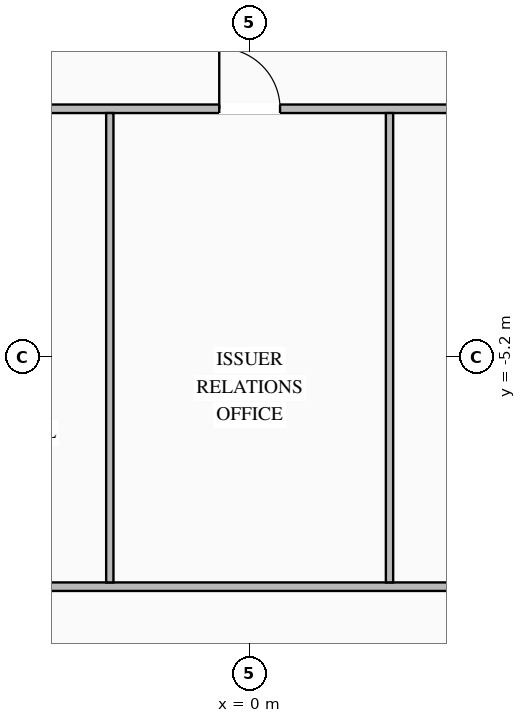
"""IFC4 building model, lengths in metres.
Left out: names, types, materials, properties, quantities, classifications, styles, units other than length and angle.
Written with IfcOpenShell. Run it as: python <this file> out.ifc"""

import sys

from ifc_helpers import new_model, si_unit, direction, frame, frame_2d, origin, place, context, subcontext, project, spatial, rectangle, extrude, element, fill, save


model = new_model("IFC4")
c1 = context("Model", 3, precision=1e-05, world=origin(), true_north=direction((0.0, 1.0)))
c2 = subcontext(c1, "Body", "Model", "MODEL_VIEW")
j1 = project(units=[si_unit("LENGTHUNIT", "METRE"), si_unit("PLANEANGLEUNIT", "RADIAN")], contexts=[c1])
p1 = place(None, origin())
s1 = spatial("IfcSite", under=j1, at=p1, CompositionType="ELEMENT")
p2 = place(p1, origin())
s2 = spatial("IfcBuilding", under=s1, at=p2, CompositionType="ELEMENT")
p3 = place(p2, frame((0.0, 0.0, 229.2)))
s3 = spatial("IfcBuildingStorey", under=s2, at=p3, CompositionType="ELEMENT", Elevation=229.2)
p4 = place(p3, frame((-6.78, -1.12, 0.0), z_axis=(0.0, 0.0, 1.0), x_axis=(1.0, 0.0, 0.0)))
e1 = element("IfcWall", 1, at=p4, inside=s3, PredefinedType="STANDARD", context=c2, shape_type="SweptSolid", body=[
    extrude(rectangle(XDim=13.56, YDim=0.14, at=frame_2d((6.78, 0.0))), origin(), (0.0, 0.0, 1.0), 3.25),
])
p5 = place(p4, frame((1.866, 0.0, 0.0)))
e2 = element("IfcOpeningElement", 2, at=p5, cuts=e1, PredefinedType="OPENING", context=c2, shape_type="SweptSolid", body=[
    extrude(rectangle(XDim=1.0, YDim=2.08, at=frame_2d((0.5, 1.04))), frame((0.0, 0.08, 0.0), z_axis=(0.0, -1.0, 0.0), x_axis=(1.0, 0.0, 0.0)), (0.0, 0.0, 1.0), 0.16),
])
p6 = place(p4, frame((6.28, 0.0, 0.0)))
e3 = element("IfcOpeningElement", 3, at=p6, cuts=e1, PredefinedType="OPENING", context=c2, shape_type="SweptSolid", body=[
    extrude(rectangle(XDim=1.0, YDim=2.08, at=frame_2d((0.5, 1.04))), frame((0.0, 0.08, 0.0), z_axis=(0.0, -1.0, 0.0), x_axis=(1.0, 0.0, 0.0)), (0.0, 0.0, 1.0), 0.16),
])
p7 = place(p4, frame((10.694, 0.0, 0.0)))
e4 = element("IfcOpeningElement", 4, at=p7, cuts=e1, PredefinedType="OPENING", context=c2, shape_type="SweptSolid", body=[
    extrude(rectangle(XDim=1.0, YDim=2.08, at=frame_2d((0.5, 1.04))), frame((0.0, 0.08, 0.0), z_axis=(0.0, -1.0, 0.0), x_axis=(1.0, 0.0, 0.0)), (0.0, 0.0, 1.0), 0.16),
])
p8 = place(p3, frame((-6.78, -8.98, 0.0), z_axis=(0.0, 0.0, 1.0), x_axis=(1.0, 0.0, 0.0)))
e5 = element("IfcWall", 5, at=p8, inside=s3, PredefinedType="STANDARD", context=c2, shape_type="SweptSolid", body=[
    extrude(rectangle(XDim=13.56, YDim=0.14, at=frame_2d((6.78, 0.0))), origin(), (0.0, 0.0, 1.0), 3.25),
])
for number, where, z_axis, x_axis in (
    (6, (-2.3, -8.91, 0.0), (0.0, 0.0, 1.0), (0.0, 1.0, 0.0)),
    (7, (2.3, -8.91, 0.0), (0.0, 0.0, 1.0), (0.0, 1.0, 0.0)),
):
    element("IfcWall", number, at=place(p3, frame(where, z_axis=z_axis, x_axis=x_axis)), inside=s3, PredefinedType="STANDARD", context=c2, shape_type="SweptSolid", body=[
        extrude(rectangle(XDim=7.72, YDim=0.12, at=frame_2d((3.86, 0.0))), origin(), (0.0, 0.0, 1.0), 3.25),
    ])
p9 = place(p6, origin())
e8 = element("IfcDoor", 8, at=p9, inside=s3, OperationType="SINGLE_SWING_LEFT", PredefinedType="DOOR", context=c2, shape_type="SweptSolid", body=[
    extrude(rectangle(XDim=1.0, YDim=2.08, at=frame_2d((0.5, 1.04))), frame((0.0, 0.025, 0.0), z_axis=(0.0, -1.0, 0.0), x_axis=(1.0, 0.0, 0.0)), (0.0, 0.0, 1.0), 0.05),
])
fill(e3, e8)
save(model, sys.argv[1])
